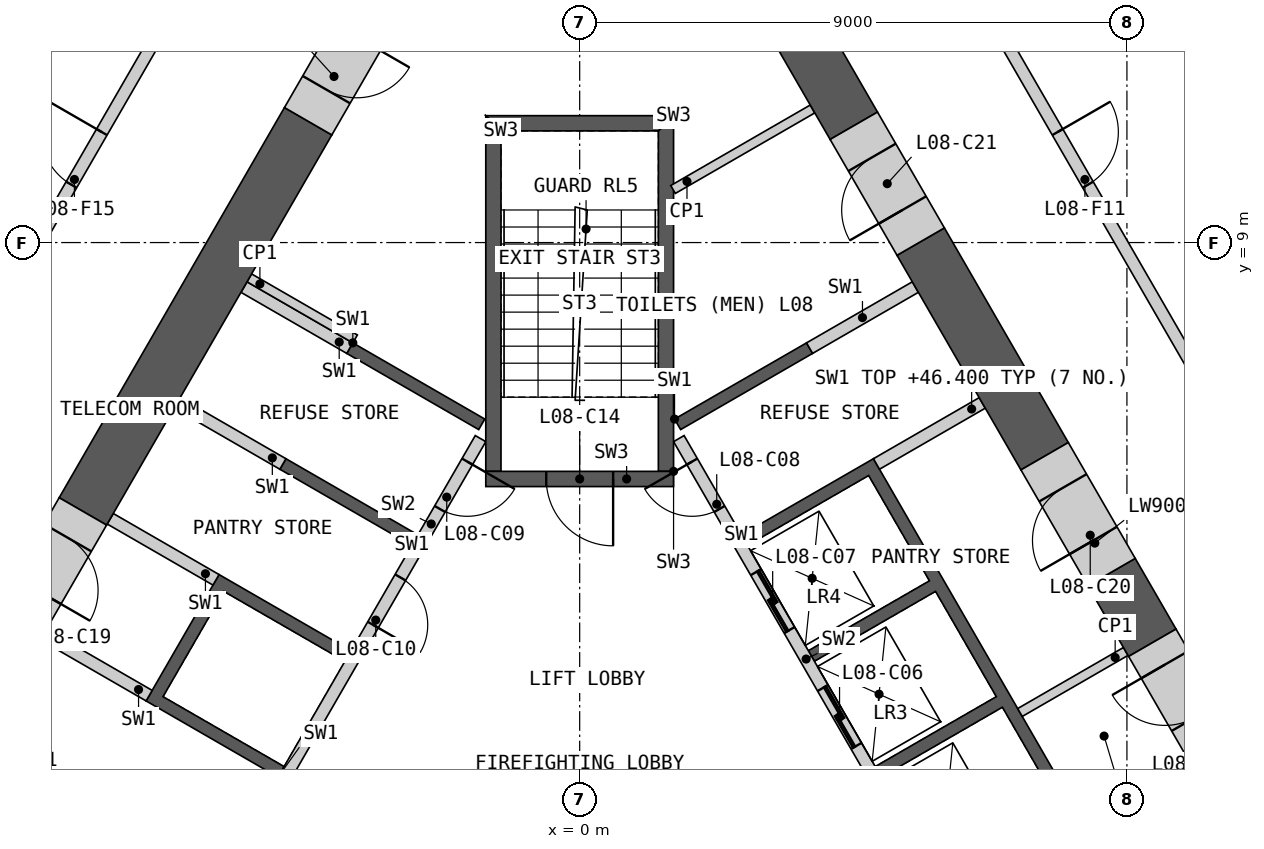
"""IFC4 building model, lengths in metres.
Left out: names, types, materials, properties, quantities, classifications, styles, units other than length and angle.
Written with IfcOpenShell. Run it as: python <this file> out.ifc"""

import sys

from ifc_helpers import new_model, si_unit, direction, frame, frame_2d, origin, place, context, subcontext, project, spatial, polyline, rectangle, outline, extrude, element, fill, save


model = new_model("IFC4")
c1 = context("Model", 3, precision=1e-05, world=origin(), true_north=direction((0.0, 1.0)))
c2 = subcontext(c1, "Body", "Model", "MODEL_VIEW")
j1 = project(units=[si_unit("LENGTHUNIT", "METRE"), si_unit("PLANEANGLEUNIT", "RADIAN")], contexts=[c1])
p1 = place(None, origin())
s1 = spatial("IfcSite", under=j1, at=p1, CompositionType="ELEMENT")
p2 = place(p1, origin())
s2 = spatial("IfcBuilding", under=s1, at=p2, CompositionType="ELEMENT")
p3 = place(p2, frame((0.0, 0.0, 42.6)))
s3 = spatial("IfcBuildingStorey", under=s2, at=p3, CompositionType="ELEMENT", Elevation=42.6)
p4 = place(p3, origin())
e1 = element("IfcWall", 1, at=p4, inside=s3, PredefinedType="SHEAR", context=c2, shape_type="SweptSolid", body=[
    extrude(outline(polyline([(1.561, 6.097), (3.731, 7.35), (3.831, 7.177), (1.66, 5.924), (1.561, 6.097)])), origin(), (0.0, 0.0, 1.0), 3.8),
])
p5 = place(p3, origin())
e2 = element("IfcWall", 2, at=p5, inside=s3, PredefinedType="SHEAR", context=c2, shape_type="SweptSolid", body=[
    extrude(outline(polyline([(2.66, 4.192), (4.831, 5.445), (8.231, -0.444), (6.061, -1.697), (5.96, -1.524), (7.952, -0.374), (6.952, 1.358), (4.96, 0.208), (4.861, 0.381), (6.852, 1.531), (5.852, 3.263), (3.861, 2.113), (3.76, 2.287), (5.752, 3.437), (4.752, 5.169), (2.76, 4.019), (2.66, 4.192)])), origin(), (0.0, 0.0, 1.0), 3.8),
])
p6 = place(p3, frame((5.817, -1.476, 0.0), z_axis=(0.0, 0.0, 1.0), x_axis=(-0.500002616675, 0.866023893041, 0.0)))
e3 = element("IfcWall", 3, at=p6, inside=s3, PredefinedType="SOLIDWALL", context=c2, shape_type="SweptSolid", body=[
    extrude(rectangle(XDim=8.373, YDim=0.2, at=frame_2d((4.187, 0.0))), origin(), (0.0, 0.0, 1.0), 3.8),
])
p7 = place(p6, frame((0.337, 0.0, 0.0)))
e4 = element("IfcOpeningElement", 4, at=p7, cuts=e3, PredefinedType="OPENING", context=c2, shape_type="SweptSolid", body=[
    extrude(rectangle(XDim=1.1, YDim=2.1, at=frame_2d((0.55, 1.05))), frame((0.0, 0.11, 0.0), z_axis=(0.0, -1.0, 0.0), x_axis=(1.0, 0.0, 0.0)), (0.0, 0.0, 1.0), 0.22),
])
p8 = place(p6, frame((2.537, 0.0, 0.0)))
e5 = element("IfcOpeningElement", 5, at=p8, cuts=e3, PredefinedType="OPENING", context=c2, shape_type="SweptSolid", body=[
    extrude(rectangle(XDim=1.1, YDim=2.1, at=frame_2d((0.55, 1.05))), frame((0.0, 0.11, 0.0), z_axis=(0.0, -1.0, 0.0), x_axis=(1.0, 0.0, 0.0)), (0.0, 0.0, 1.0), 0.22),
])
p9 = place(p6, frame((4.737, 0.0, 0.0)))
e6 = element("IfcOpeningElement", 6, at=p9, cuts=e3, PredefinedType="OPENING", context=c2, shape_type="SweptSolid", body=[
    extrude(rectangle(XDim=1.1, YDim=2.1, at=frame_2d((0.55, 1.05))), frame((0.0, 0.11, 0.0), z_axis=(0.0, -1.0, 0.0), x_axis=(1.0, 0.0, 0.0)), (0.0, 0.0, 1.0), 0.22),
])
p10 = place(p6, frame((7.037, 0.0, 0.0)))
e7 = element("IfcOpeningElement", 7, at=p10, cuts=e3, PredefinedType="OPENING", context=c2, shape_type="SweptSolid", body=[
    extrude(rectangle(XDim=0.9, YDim=2.1, at=frame_2d((0.45, 1.05))), frame((0.0, 0.11, 0.0), z_axis=(0.0, -1.0, 0.0), x_axis=(1.0, 0.0, 0.0)), (0.0, 0.0, 1.0), 0.22),
])
p11 = place(p3, frame((4.881, 5.358, 0.0), z_axis=(0.0, 0.0, 1.0), x_axis=(0.866035824272, 0.499981950752, 0.0)))
e8 = element("IfcWall", 8, at=p11, inside=s3, PredefinedType="SHEAR", context=c2, shape_type="SweptSolid", body=[
    extrude(rectangle(XDim=2.009, YDim=0.2, at=frame_2d((1.004, 0.0))), origin(), (0.0, 0.0, 1.0), 3.8),
])
p12 = place(p3, frame((3.781, 7.263, 0.0), z_axis=(0.0, 0.0, 1.0), x_axis=(0.865983199114, 0.50007309351, 0.0)))
e9 = element("IfcWall", 9, at=p12, inside=s3, PredefinedType="SHEAR", context=c2, shape_type="SweptSolid", body=[
    extrude(rectangle(XDim=2.009, YDim=0.2, at=frame_2d((1.004, 0.0))), origin(), (0.0, 0.0, 1.0), 3.8),
])
p13 = place(p3, origin())
e10 = element("IfcWall", 10, at=p13, inside=s3, PredefinedType="SHEAR", context=c2, shape_type="SweptSolid", body=[
    extrude(outline(polyline([(-4.96, 0.208), (-7.131, 1.461), (-5.931, 3.54), (-3.76, 2.287), (-3.861, 2.113), (-5.852, 3.263), (-6.852, 1.531), (-4.861, 0.381), (-4.96, 0.208)])), origin(), (0.0, 0.0, 1.0), 3.8),
])
p14 = place(p3, origin())
e11 = element("IfcWall", 11, at=p14, inside=s3, PredefinedType="SHEAR", context=c2, shape_type="SweptSolid", body=[
    extrude(outline(polyline([(-2.76, 4.019), (-4.931, 5.272), (-4.831, 5.445), (-2.66, 4.192), (-2.76, 4.019)])), origin(), (0.0, 0.0, 1.0), 3.8),
])
p15 = place(p3, origin())
e12 = element("IfcWall", 12, at=p15, inside=s3, PredefinedType="SHEAR", context=c2, shape_type="SweptSolid", body=[
    extrude(outline(polyline([(-3.731, 7.35), (-1.561, 6.097), (-1.66, 5.924), (-3.831, 7.177), (-3.731, 7.35)])), origin(), (0.0, 0.0, 1.0), 3.8),
])
p16 = place(p3, frame((-1.631, 5.776, 0.0), z_axis=(0.0, 0.0, 1.0), x_axis=(-0.499992876559, -0.866029516466, 0.0)))
e13 = element("IfcWall", 13, at=p16, inside=s3, PredefinedType="SOLIDWALL", context=c2, shape_type="SweptSolid", body=[
    extrude(rectangle(XDim=6.486, YDim=0.2, at=frame_2d((3.243, 0.0))), origin(), (0.0, 0.0, 1.0), 3.8),
])
p17 = place(p16, frame((0.437, 0.0, 0.0)))
e14 = element("IfcOpeningElement", 14, at=p17, cuts=e13, PredefinedType="OPENING", context=c2, shape_type="SweptSolid", body=[
    extrude(rectangle(XDim=0.9, YDim=2.1, at=frame_2d((0.45, 1.05))), frame((0.0, 0.11, 0.0), z_axis=(0.0, -1.0, 0.0), x_axis=(1.0, 0.0, 0.0)), (0.0, 0.0, 1.0), 0.22),
])
p18 = place(p16, frame((2.637, 0.0, 0.0)))
e15 = element("IfcOpeningElement", 15, at=p18, cuts=e13, PredefinedType="OPENING", context=c2, shape_type="SweptSolid", body=[
    extrude(rectangle(XDim=0.9, YDim=2.1, at=frame_2d((0.45, 1.05))), frame((0.0, 0.11, 0.0), z_axis=(0.0, -1.0, 0.0), x_axis=(1.0, 0.0, 0.0)), (0.0, 0.0, 1.0), 0.22),
])
p19 = place(p3, frame((-3.781, 7.263, 0.0), z_axis=(0.0, 0.0, 1.0), x_axis=(-0.865983199114, 0.50007309351, 0.0)))
e16 = element("IfcWall", 16, at=p19, inside=s3, PredefinedType="SHEAR", context=c2, shape_type="SweptSolid", body=[
    extrude(rectangle(XDim=2.009, YDim=0.2, at=frame_2d((1.004, 0.0))), origin(), (0.0, 0.0, 1.0), 3.8),
])
p20 = place(p3, frame((-4.881, 5.358, 0.0), z_axis=(0.0, 0.0, 1.0), x_axis=(-0.866035824272, 0.499981950752, 0.0)))
e17 = element("IfcWall", 17, at=p20, inside=s3, PredefinedType="SHEAR", context=c2, shape_type="SweptSolid", body=[
    extrude(rectangle(XDim=2.009, YDim=0.2, at=frame_2d((1.004, 0.0))), origin(), (0.0, 0.0, 1.0), 3.8),
])
p21 = place(p3, frame((-5.981, 3.453, 0.0), z_axis=(0.0, 0.0, 1.0), x_axis=(-0.866013584312, 0.500020471368, 0.0)))
e18 = element("IfcWall", 18, at=p21, inside=s3, PredefinedType="SHEAR", context=c2, shape_type="SweptSolid", body=[
    extrude(rectangle(XDim=2.009, YDim=0.2, at=frame_2d((1.005, 0.0))), origin(), (0.0, 0.0, 1.0), 3.8),
])
p22 = place(p3, frame((-7.081, 1.548, 0.0), z_axis=(0.0, 0.0, 1.0), x_axis=(-0.865983199114, 0.50007309351, 0.0)))
e19 = element("IfcWall", 19, at=p22, inside=s3, PredefinedType="SHEAR", context=c2, shape_type="SweptSolid", body=[
    extrude(rectangle(XDim=2.009, YDim=0.2, at=frame_2d((1.004, 0.0))), origin(), (0.0, 0.0, 1.0), 3.8),
])
p23 = place(p3, frame((-8.181, -0.357, 0.0), z_axis=(0.0, 0.0, 1.0), x_axis=(-0.866035824272, 0.499981950752, 0.0)))
e20 = element("IfcWall", 20, at=p23, inside=s3, PredefinedType="SHEAR", context=c2, shape_type="SweptSolid", body=[
    extrude(rectangle(XDim=2.009, YDim=0.2, at=frame_2d((1.004, 0.0))), origin(), (0.0, 0.0, 1.0), 3.8),
])
p24 = place(p3, origin())
e21 = element("IfcWall", 21, at=p24, inside=s3, PredefinedType="SHEAR", context=c2, shape_type="SweptSolid", body=[
    extrude(outline(polyline([(1.544, 5.237), (1.544, 11.087), (1.294, 10.837), (1.294, 5.237), (1.544, 5.237)])), origin(), (0.0, 0.0, 1.0), 3.8),
])
p25 = place(p3, origin())
e22 = element("IfcWall", 22, at=p25, inside=s3, PredefinedType="SHEAR", context=c2, shape_type="SweptSolid", body=[
    extrude(outline(polyline([(1.544, 11.087), (-1.544, 11.087), (-1.294, 10.837), (1.294, 10.837), (1.544, 11.087)])), origin(), (0.0, 0.0, 1.0), 3.8),
])
p26 = place(p3, origin())
e23 = element("IfcWall", 23, at=p26, inside=s3, PredefinedType="SHEAR", context=c2, shape_type="SweptSolid", body=[
    extrude(outline(polyline([(-1.294, 10.837), (-1.544, 11.087), (-1.544, 5.237), (-1.294, 5.237), (-1.294, 10.837)])), origin(), (0.0, 0.0, 1.0), 3.8),
])
p27 = place(p3, frame((1.544, 5.112, 0.0), z_axis=(0.0, 0.0, 1.0), x_axis=(-1.0, 0.0, 0.0)))
e24 = element("IfcWall", 24, at=p27, inside=s3, PredefinedType="SHEAR", context=c2, shape_type="SweptSolid", body=[
    extrude(rectangle(XDim=3.088, YDim=0.25, at=frame_2d((1.544, 0.0))), origin(), (0.0, 0.0, 1.0), 3.8),
])
p28 = place(p27, frame((0.994, 0.0, 0.0)))
e25 = element("IfcOpeningElement", 25, at=p28, cuts=e24, PredefinedType="OPENING", context=c2, shape_type="SweptSolid", body=[
    extrude(rectangle(XDim=1.1, YDim=2.1, at=frame_2d((0.55, 1.05))), frame((0.0, 0.135, 0.0), z_axis=(0.0, -1.0, 0.0), x_axis=(1.0, 0.0, 0.0)), (0.0, 0.0, 1.0), 0.27),
])
for number, where, z_axis, x_axis in (
    (26, (-8.268, -0.509, 0.0), (0.0, 0.0, 1.0), (-0.866, 0.5, 0.0)),
    (27, (-3.693, 7.415, 0.0), (0.0, 0.0, 1.0), (-0.866, 0.5, 0.0)),
    (28, (8.268, -0.509, 0.0), (0.0, 0.0, 1.0), (0.866, 0.5, 0.0)),
):
    element("IfcWall", number, at=place(p3, frame(where, z_axis=z_axis, x_axis=x_axis)), inside=s3, PredefinedType="PARTITIONING", context=c2, shape_type="SweptSolid", body=[
        extrude(rectangle(XDim=2.009, YDim=0.15, at=frame_2d((1.004, 0.0))), origin(), (0.0, 0.0, 1.0), 3.8),
    ])
p29 = place(p3, frame((3.829, 11.197, 0.0), z_axis=(0.0, 0.0, 1.0), x_axis=(-0.866016748302, -0.500014991436, 0.0)))
e29 = element("IfcWall", 29, at=p29, inside=s3, PredefinedType="PARTITIONING", context=c2, shape_type="SweptSolid", body=[
    extrude(rectangle(XDim=2.649, YDim=0.15, at=frame_2d((1.324, 0.0))), origin(), (0.0, 0.0, 1.0), 3.8),
])
p30 = place(p3, frame((8.981, 2.275, 0.0), z_axis=(0.0, 0.0, 1.0), x_axis=(-0.866013584312, -0.500020471368, 0.0)))
e30 = element("IfcWall", 30, at=p30, inside=s3, PredefinedType="PARTITIONING", context=c2, shape_type="SweptSolid", body=[
    extrude(rectangle(XDim=2.009, YDim=0.15, at=frame_2d((1.005, 0.0))), origin(), (0.0, 0.0, 1.0), 3.8),
])
p31 = place(p3, frame((7.646, 5.486, 0.0), z_axis=(0.0, 0.0, 1.0), x_axis=(-0.499978218965, 0.866037978706, 0.0)))
e31 = element("IfcWall", 31, at=p31, inside=s3, PredefinedType="SHEAR", context=c2, shape_type="SweptSolid", body=[
    extrude(rectangle(XDim=4.076, YDim=0.9, at=frame_2d((2.038, 0.0))), origin(), (0.0, 0.0, 1.0), 3.8),
])
p32 = place(p3, frame((4.509, 10.921, 0.0), z_axis=(0.0, 0.0, 1.0), x_axis=(-0.49999004381, 0.866031151917, 0.0)))
e32 = element("IfcWall", 32, at=p32, inside=s3, PredefinedType="SHEAR", context=c2, shape_type="SweptSolid", body=[
    extrude(rectangle(XDim=3.975, YDim=0.9, at=frame_2d((1.988, 0.0))), origin(), (0.0, 0.0, 1.0), 3.8),
])
p33 = place(p3, frame((9.418, 2.418, 0.0), z_axis=(0.0, 0.0, 1.0), x_axis=(-0.49995335277, 0.8660523339, 0.0)))
e33 = element("IfcWall", 33, at=p33, inside=s3, PredefinedType="SHEAR", context=c2, shape_type="SweptSolid", body=[
    extrude(rectangle(XDim=1.343, YDim=0.9, at=frame_2d((0.671, 0.0))), origin(), (0.0, 0.0, 1.0), 3.8),
])
p34 = place(p3, frame((-4.466, 10.995, 0.0), z_axis=(0.0, 0.0, 1.0), x_axis=(-0.500012427149, -0.866018228848, 0.0)))
e34 = element("IfcWall", 34, at=p34, inside=s3, PredefinedType="SHEAR", context=c2, shape_type="SweptSolid", body=[
    extrude(rectangle(XDim=7.409, YDim=0.9, at=frame_2d((3.705, 0.0))), origin(), (0.0, 0.0, 1.0), 3.8),
])
p35 = place(p3, frame((10.35, 0.803, 0.0), z_axis=(0.0, 0.0, 1.0), x_axis=(-0.500081290722, 0.865978465477, 0.0)))
e35 = element("IfcWall", 35, at=p35, inside=s3, PredefinedType="SHEAR", context=c2, shape_type="SweptSolid", body=[
    extrude(rectangle(XDim=1.865, YDim=0.9, at=frame_2d((0.933, 0.0))), origin(), (0.0, 0.0, 1.0), 3.8),
])
p36 = place(p35, frame((0.45, 0.0, 0.0)))
e36 = element("IfcOpeningElement", 36, at=p36, cuts=e35, PredefinedType="OPENING", context=c2, shape_type="SweptSolid", body=[
    extrude(rectangle(XDim=1.0, YDim=2.1, at=frame_2d((0.5, 1.05))), frame((0.0, 0.46, 0.0), z_axis=(0.0, -1.0, 0.0), x_axis=(1.0, 0.0, 0.0)), (0.0, 0.0, 1.0), 0.92),
])
p37 = place(p3, frame((-8.17, 4.579, 0.0), z_axis=(0.0, 0.0, 1.0), x_axis=(-0.499888406853, -0.866089822532, 0.0)))
e37 = element("IfcWall", 37, at=p37, inside=s3, PredefinedType="SHEAR", context=c2, shape_type="SweptSolid", body=[
    extrude(rectangle(XDim=2.08, YDim=0.9, at=frame_2d((1.04, 0.0))), origin(), (0.0, 0.0, 1.0), 3.8),
])
p38 = place(p37, frame((0.5, 0.0, 0.0)))
e38 = element("IfcOpeningElement", 38, at=p38, cuts=e37, PredefinedType="OPENING", context=c2, shape_type="SweptSolid", body=[
    extrude(rectangle(XDim=1.0, YDim=2.1, at=frame_2d((0.5, 1.05))), frame((0.0, 0.46, 0.0), z_axis=(0.0, -1.0, 0.0), x_axis=(1.0, 0.0, 0.0)), (0.0, 0.0, 1.0), 0.92),
])
p39 = place(p3, frame((8.747, 3.58, 0.0), z_axis=(0.0, 0.0, 1.0), x_axis=(-0.50002983664, 0.866008176907, 0.0)))
e39 = element("IfcWall", 39, at=p39, inside=s3, PredefinedType="SHEAR", context=c2, shape_type="SweptSolid", body=[
    extrude(rectangle(XDim=2.2, YDim=0.9, at=frame_2d((1.1, 0.0))), origin(), (0.0, 0.0, 1.0), 3.8),
])
p40 = place(p39, frame((0.6, 0.0, 0.0)))
e40 = element("IfcOpeningElement", 40, at=p40, cuts=e39, PredefinedType="OPENING", context=c2, shape_type="SweptSolid", body=[
    extrude(rectangle(XDim=1.0, YDim=2.1, at=frame_2d((0.5, 1.05))), frame((0.0, 0.46, 0.0), z_axis=(0.0, -1.0, 0.0), x_axis=(1.0, 0.0, 0.0)), (0.0, 0.0, 1.0), 0.92),
])
p41 = place(p3, frame((5.608, 9.016, 0.0), z_axis=(0.0, 0.0, 1.0), x_axis=(-0.499994660107, 0.866028486751, 0.0)))
e41 = element("IfcWall", 41, at=p41, inside=s3, PredefinedType="SHEAR", context=c2, shape_type="SweptSolid", body=[
    extrude(rectangle(XDim=2.2, YDim=0.9, at=frame_2d((1.1, 0.0))), origin(), (0.0, 0.0, 1.0), 3.8),
])
p42 = place(p41, frame((0.6, 0.0, 0.0)))
e42 = element("IfcOpeningElement", 42, at=p42, cuts=e41, PredefinedType="OPENING", context=c2, shape_type="SweptSolid", body=[
    extrude(rectangle(XDim=1.0, YDim=2.1, at=frame_2d((0.5, 1.05))), frame((0.0, 0.46, 0.0), z_axis=(0.0, -1.0, 0.0), x_axis=(1.0, 0.0, 0.0)), (0.0, 0.0, 1.0), 0.92),
])
p43 = place(p3, frame((-3.365, 12.9, 0.0), z_axis=(0.0, 0.0, 1.0), x_axis=(-0.500077893725, -0.86598042715, 0.0)))
e43 = element("IfcWall", 43, at=p43, inside=s3, PredefinedType="SHEAR", context=c2, shape_type="SweptSolid", body=[
    extrude(rectangle(XDim=2.2, YDim=0.9, at=frame_2d((1.1, 0.0))), origin(), (0.0, 0.0, 1.0), 3.8),
])
p44 = place(p43, frame((0.6, 0.0, 0.0)))
e44 = element("IfcOpeningElement", 44, at=p44, cuts=e43, PredefinedType="OPENING", context=c2, shape_type="SweptSolid", body=[
    extrude(rectangle(XDim=1.0, YDim=2.1, at=frame_2d((0.5, 1.05))), frame((0.0, 0.46, 0.0), z_axis=(0.0, -1.0, 0.0), x_axis=(1.0, 0.0, 0.0)), (0.0, 0.0, 1.0), 0.92),
])
p45 = place(p3, frame((-10.439, 6.35, 0.0), z_axis=(0.0, 0.0, 1.0), x_axis=(0.50001002959, 0.86601961312, 0.0)))
e45 = element("IfcWall", 45, at=p45, inside=s3, PredefinedType="PARTITIONING", context=c2, shape_type="SweptSolid", body=[
    extrude(rectangle(XDim=10.019, YDim=0.2, at=frame_2d((5.009, 0.0))), origin(), (0.0, 0.0, 1.0), 3.8),
])
p46 = place(p45, frame((4.159, 0.0, 0.0)))
e46 = element("IfcOpeningElement", 46, at=p46, cuts=e45, PredefinedType="OPENING", context=c2, shape_type="SweptSolid", body=[
    extrude(rectangle(XDim=1.0, YDim=2.1, at=frame_2d((0.5, 1.05))), frame((0.0, 0.11, 0.0), z_axis=(0.0, -1.0, 0.0), x_axis=(1.0, 0.0, 0.0)), (0.0, 0.0, 1.0), 0.22),
])
p47 = place(p3, frame((5.429, 15.026, 0.0), z_axis=(0.0, 0.0, 1.0), x_axis=(0.50001002959, -0.86601961312, 0.0)))
e47 = element("IfcWall", 47, at=p47, inside=s3, PredefinedType="PARTITIONING", context=c2, shape_type="SweptSolid", body=[
    extrude(rectangle(XDim=10.019, YDim=0.2, at=frame_2d((5.009, 0.0))), origin(), (0.0, 0.0, 1.0), 3.8),
])
p48 = place(p47, frame((4.86, 0.0, 0.0)))
e48 = element("IfcOpeningElement", 48, at=p48, cuts=e47, PredefinedType="OPENING", context=c2, shape_type="SweptSolid", body=[
    extrude(rectangle(XDim=1.0, YDim=2.1, at=frame_2d((0.5, 1.05))), frame((0.0, 0.11, 0.0), z_axis=(0.0, -1.0, 0.0), x_axis=(1.0, 0.0, 0.0)), (0.0, 0.0, 1.0), 0.22),
])
p49 = place(p8, origin())
e49 = element("IfcDoor", 49, at=p49, inside=s3, OperationType="SLIDING_TO_LEFT", PredefinedType="DOOR", context=c2, shape_type="SweptSolid", body=[
    extrude(rectangle(XDim=1.1, YDim=2.1, at=frame_2d((0.55, 1.05))), frame((0.0, 0.025, 0.0), z_axis=(0.0, -1.0, 0.0), x_axis=(1.0, 0.0, 0.0)), (0.0, 0.0, 1.0), 0.05),
])
fill(e5, e49)
p50 = place(p9, origin())
e50 = element("IfcDoor", 50, at=p50, inside=s3, OperationType="SLIDING_TO_LEFT", PredefinedType="DOOR", context=c2, shape_type="SweptSolid", body=[
    extrude(rectangle(XDim=1.1, YDim=2.1, at=frame_2d((0.55, 1.05))), frame((0.0, 0.025, 0.0), z_axis=(0.0, -1.0, 0.0), x_axis=(1.0, 0.0, 0.0)), (0.0, 0.0, 1.0), 0.05),
])
fill(e6, e50)
p51 = place(p10, origin())
e51 = element("IfcDoor", 51, at=p51, inside=s3, OperationType="SINGLE_SWING_RIGHT", PredefinedType="DOOR", context=c2, shape_type="SweptSolid", body=[
    extrude(rectangle(XDim=0.9, YDim=2.1, at=frame_2d((0.45, 1.05))), frame((0.0, 0.025, 0.0), z_axis=(0.0, -1.0, 0.0), x_axis=(1.0, 0.0, 0.0)), (0.0, 0.0, 1.0), 0.05),
])
fill(e7, e51)
p52 = place(p17, origin())
e52 = element("IfcDoor", 52, at=p52, inside=s3, OperationType="SINGLE_SWING_LEFT", PredefinedType="DOOR", context=c2, shape_type="SweptSolid", body=[
    extrude(rectangle(XDim=0.9, YDim=2.1, at=frame_2d((0.45, 1.05))), frame((0.0, 0.025, 0.0), z_axis=(0.0, -1.0, 0.0), x_axis=(1.0, 0.0, 0.0)), (0.0, 0.0, 1.0), 0.05),
])
fill(e14, e52)
p53 = place(p18, origin())
e53 = element("IfcDoor", 53, at=p53, inside=s3, OperationType="SINGLE_SWING_RIGHT", PredefinedType="DOOR", context=c2, shape_type="SweptSolid", body=[
    extrude(rectangle(XDim=0.9, YDim=2.1, at=frame_2d((0.45, 1.05))), frame((0.0, 0.025, 0.0), z_axis=(0.0, -1.0, 0.0), x_axis=(1.0, 0.0, 0.0)), (0.0, 0.0, 1.0), 0.05),
])
fill(e15, e53)
p54 = place(p28, origin())
e54 = element("IfcDoor", 54, at=p54, inside=s3, OperationType="SINGLE_SWING_LEFT", PredefinedType="DOOR", context=c2, shape_type="SweptSolid", body=[
    extrude(rectangle(XDim=1.1, YDim=2.1, at=frame_2d((0.55, 1.05))), frame((0.0, 0.025, 0.0), z_axis=(0.0, -1.0, 0.0), x_axis=(1.0, 0.0, 0.0)), (0.0, 0.0, 1.0), 0.05),
])
fill(e25, e54)
p55 = place(p36, origin())
e55 = element("IfcDoor", 55, at=p55, inside=s3, OperationType="SINGLE_SWING_RIGHT", PredefinedType="DOOR", context=c2, shape_type="SweptSolid", body=[
    extrude(rectangle(XDim=1.0, YDim=2.1, at=frame_2d((0.5, 1.05))), frame((0.0, 0.205, 0.0), z_axis=(0.0, -1.0, 0.0), x_axis=(1.0, 0.0, 0.0)), (0.0, 0.0, 1.0), 0.05),
])
fill(e36, e55)
p56 = place(p38, origin())
e56 = element("IfcDoor", 56, at=p56, inside=s3, OperationType="SINGLE_SWING_RIGHT", PredefinedType="DOOR", context=c2, shape_type="SweptSolid", body=[
    extrude(rectangle(XDim=1.0, YDim=2.1, at=frame_2d((0.5, 1.05))), frame((0.0, 0.205, 0.0), z_axis=(0.0, -1.0, 0.0), x_axis=(1.0, 0.0, 0.0)), (0.0, 0.0, 1.0), 0.05),
])
fill(e38, e56)
p57 = place(p40, origin())
e57 = element("IfcDoor", 57, at=p57, inside=s3, OperationType="SINGLE_SWING_LEFT", PredefinedType="DOOR", context=c2, shape_type="SweptSolid", body=[
    extrude(rectangle(XDim=1.0, YDim=2.1, at=frame_2d((0.5, 1.05))), frame((0.0, 0.205, 0.0), z_axis=(0.0, -1.0, 0.0), x_axis=(1.0, 0.0, 0.0)), (0.0, 0.0, 1.0), 0.05),
])
fill(e40, e57)
p58 = place(p42, origin())
e58 = element("IfcDoor", 58, at=p58, inside=s3, OperationType="SINGLE_SWING_LEFT", PredefinedType="DOOR", context=c2, shape_type="SweptSolid", body=[
    extrude(rectangle(XDim=1.0, YDim=2.1, at=frame_2d((0.5, 1.05))), frame((0.0, 0.205, 0.0), z_axis=(0.0, -1.0, 0.0), x_axis=(1.0, 0.0, 0.0)), (0.0, 0.0, 1.0), 0.05),
])
fill(e42, e58)
p59 = place(p44, origin())
e59 = element("IfcDoor", 59, at=p59, inside=s3, OperationType="SINGLE_SWING_LEFT", PredefinedType="DOOR", context=c2, shape_type="SweptSolid", body=[
    extrude(rectangle(XDim=1.0, YDim=2.1, at=frame_2d((0.5, 1.05))), frame((0.0, 0.205, 0.0), z_axis=(0.0, -1.0, 0.0), x_axis=(1.0, 0.0, 0.0)), (0.0, 0.0, 1.0), 0.05),
])
fill(e44, e59)
p60 = place(p48, origin())
e60 = element("IfcDoor", 60, at=p60, inside=s3, OperationType="SINGLE_SWING_LEFT", PredefinedType="DOOR", context=c2, shape_type="SweptSolid", body=[
    extrude(rectangle(XDim=1.0, YDim=2.1, at=frame_2d((0.5, 1.05))), frame((0.0, 0.025, 0.0), z_axis=(0.0, -1.0, 0.0), x_axis=(1.0, 0.0, 0.0)), (0.0, 0.0, 1.0), 0.05),
])
fill(e48, e60)
p61 = place(p46, origin())
e61 = element("IfcDoor", 61, at=p61, inside=s3, OperationType="SINGLE_SWING_RIGHT", PredefinedType="DOOR", context=c2, shape_type="SweptSolid", body=[
    extrude(rectangle(XDim=1.0, YDim=2.1, at=frame_2d((0.5, 1.05))), frame((0.0, 0.025, 0.0), z_axis=(0.0, -1.0, 0.0), x_axis=(1.0, 0.0, 0.0)), (0.0, 0.0, 1.0), 0.05),
])
fill(e46, e61)
save(model, sys.argv[1])
